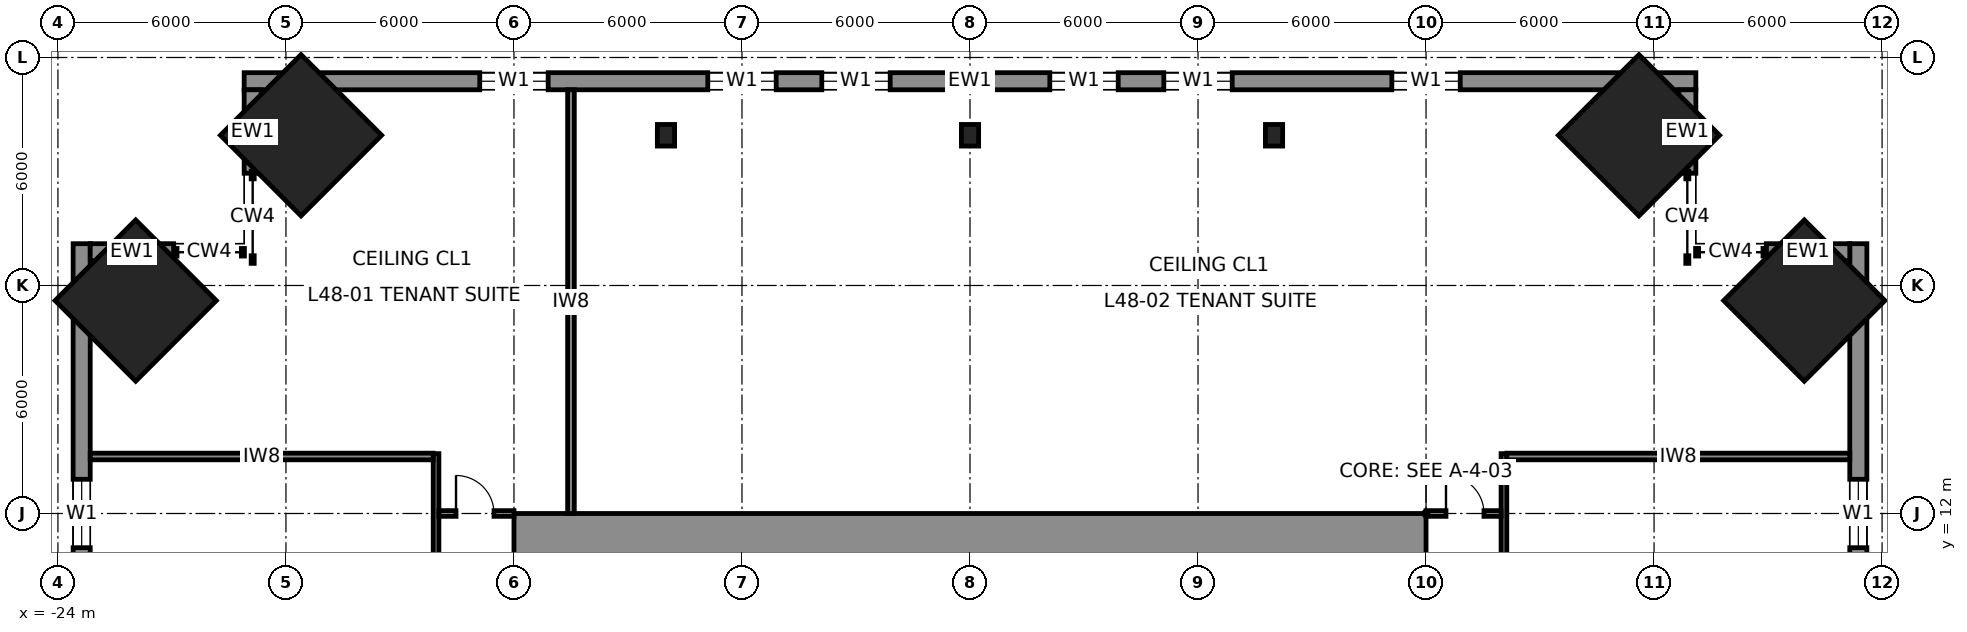
"""IFC4 building model, lengths in metres.
Left out: names, types, materials, properties, quantities, classifications, styles, units other than length and angle.
Written with IfcOpenShell. Run it as: python <this file> out.ifc"""

import sys

from ifc_helpers import new_model, si_unit, direction, frame, frame_2d, origin, origin_2d, place, context, subcontext, project, spatial, rectangle, i_section, extrude, element, fill, save


model = new_model("IFC4")
c1 = context("Model", 3, precision=1e-05, world=origin(), true_north=direction((0.0, 1.0)))
c2 = subcontext(c1, "Body", "Model", "MODEL_VIEW")
j1 = project(units=[si_unit("LENGTHUNIT", "METRE"), si_unit("PLANEANGLEUNIT", "RADIAN")], contexts=[c1])
p1 = place(None, origin())
s1 = spatial("IfcSite", under=j1, at=p1, CompositionType="ELEMENT")
p2 = place(p1, origin())
s2 = spatial("IfcBuilding", under=s1, at=p2, CompositionType="ELEMENT")
p3 = place(p2, frame((0.0, 0.0, 221.8)))
s3 = spatial("IfcBuildingStorey", under=s2, at=p3, CompositionType="ELEMENT", Elevation=221.8)
for number, where, z_axis, x_axis in (
    (1, (17.603, 21.953, 0.0), (-0.04, -0.04, 0.998), (0.707, -0.708, 0.0)),
    (2, (21.953, 17.603, 0.0), (-0.04, -0.04, 0.998), (0.708, -0.707, 0.0)),
    (3, (-21.953, 17.603, 0.0), (0.04, -0.04, 0.998), (0.708, 0.707, 0.0)),
    (4, (-17.603, 21.953, 0.0), (0.04, -0.04, 0.998), (0.707, 0.708, 0.0)),
):
    element("IfcColumn", number, at=place(p3, frame(where, z_axis=z_axis, x_axis=x_axis)), inside=s3, PredefinedType="COLUMN", context=c2, shape_type="SweptSolid", body=[
        extrude(rectangle(XDim=3.0, YDim=3.0, at=origin_2d()), origin(), (0.0, 0.0, 1.0), 4.007),
    ])
for number, where, z_axis, x_axis in (
    (5, (0.0, 21.953, 0.0), (0.0, -0.04, 0.999), (1.0, 0.0, 0.0)),
    (6, (8.0, 21.953, 0.0), (0.0, -0.04, 0.999), (1.0, 0.0, 0.0)),
    (7, (-8.0, 21.953, 0.0), (0.0, -0.04, 0.999), (1.0, 0.0, 0.0)),
):
    element("IfcColumn", number, at=place(p3, frame(where, z_axis=z_axis, x_axis=x_axis)), inside=s3, PredefinedType="COLUMN", context=c2, shape_type="SweptSolid", body=[
        extrude(i_section(OverallWidth=0.454, OverallDepth=0.569, WebThickness=0.078, FlangeThickness=0.125, at=origin_2d()), origin(), (0.0, 0.0, 1.0), 4.003),
    ])
p4 = place(p3, frame((-12.0, 11.25, 0.0), z_axis=(0.0, 0.0, 1.0), x_axis=(1.0, 0.0, 0.0)))
e8 = element("IfcWall", 8, at=p4, inside=s3, PredefinedType="SHEAR", context=c2, shape_type="SweptSolid", body=[
    extrude(rectangle(XDim=24.0, YDim=1.5, at=frame_2d((12.0, 0.0))), origin(), (0.0, 0.0, 1.0), 4.0),
])
p5 = place(p3, frame((19.1, 23.375, 0.0), z_axis=(0.0, 0.0, 1.0), x_axis=(-1.0, 0.0, 0.0)))
e9 = element("IfcWall", 9, at=p5, inside=s3, PredefinedType="SOLIDWALL", context=c2, shape_type="SweptSolid", body=[
    extrude(rectangle(XDim=38.2, YDim=0.45, at=frame_2d((19.1, 0.0))), origin(), (0.0, 0.0, 1.0), 3.83),
])
p6 = place(p5, frame((6.2, 0.0, 0.7)))
e10 = element("IfcOpeningElement", 10, at=p6, cuts=e9, PredefinedType="OPENING", context=c2, shape_type="SweptSolid", body=[
    extrude(rectangle(XDim=1.8, YDim=2.6, at=frame_2d((0.9, 1.3))), frame((0.0, 0.235, 0.0), z_axis=(0.0, -1.0, 0.0), x_axis=(1.0, 0.0, 0.0)), (0.0, 0.0, 1.0), 0.47),
])
p7 = place(p5, frame((12.2, 0.0, 0.7)))
e11 = element("IfcOpeningElement", 11, at=p7, cuts=e9, PredefinedType="OPENING", context=c2, shape_type="SweptSolid", body=[
    extrude(rectangle(XDim=1.8, YDim=2.6, at=frame_2d((0.9, 1.3))), frame((0.0, 0.235, 0.0), z_axis=(0.0, -1.0, 0.0), x_axis=(1.0, 0.0, 0.0)), (0.0, 0.0, 1.0), 0.47),
])
p8 = place(p5, frame((15.2, 0.0, 0.7)))
e12 = element("IfcOpeningElement", 12, at=p8, cuts=e9, PredefinedType="OPENING", context=c2, shape_type="SweptSolid", body=[
    extrude(rectangle(XDim=1.8, YDim=2.6, at=frame_2d((0.9, 1.3))), frame((0.0, 0.235, 0.0), z_axis=(0.0, -1.0, 0.0), x_axis=(1.0, 0.0, 0.0)), (0.0, 0.0, 1.0), 0.47),
])
p9 = place(p5, frame((21.2, 0.0, 0.7)))
e13 = element("IfcOpeningElement", 13, at=p9, cuts=e9, PredefinedType="OPENING", context=c2, shape_type="SweptSolid", body=[
    extrude(rectangle(XDim=1.8, YDim=2.6, at=frame_2d((0.9, 1.3))), frame((0.0, 0.235, 0.0), z_axis=(0.0, -1.0, 0.0), x_axis=(1.0, 0.0, 0.0)), (0.0, 0.0, 1.0), 0.47),
])
p10 = place(p5, frame((24.2, 0.0, 0.7)))
e14 = element("IfcOpeningElement", 14, at=p10, cuts=e9, PredefinedType="OPENING", context=c2, shape_type="SweptSolid", body=[
    extrude(rectangle(XDim=1.8, YDim=2.6, at=frame_2d((0.9, 1.3))), frame((0.0, 0.235, 0.0), z_axis=(0.0, -1.0, 0.0), x_axis=(1.0, 0.0, 0.0)), (0.0, 0.0, 1.0), 0.47),
])
p11 = place(p5, frame((30.2, 0.0, 0.7)))
e15 = element("IfcOpeningElement", 15, at=p11, cuts=e9, PredefinedType="OPENING", context=c2, shape_type="SweptSolid", body=[
    extrude(rectangle(XDim=1.8, YDim=2.6, at=frame_2d((0.9, 1.3))), frame((0.0, 0.235, 0.0), z_axis=(0.0, -1.0, 0.0), x_axis=(1.0, 0.0, 0.0)), (0.0, 0.0, 1.0), 0.47),
])
p12 = place(p3, frame((23.375, -19.1, 0.0), z_axis=(0.0, 0.0, 1.0), x_axis=(0.0, 1.0, 0.0)))
e16 = element("IfcWall", 16, at=p12, inside=s3, PredefinedType="SOLIDWALL", context=c2, shape_type="SweptSolid", body=[
    extrude(rectangle(XDim=38.2, YDim=0.45, at=frame_2d((19.1, 0.0))), origin(), (0.0, 0.0, 1.0), 3.83),
])
p13 = place(p12, frame((6.2, 0.0, 0.7)))
e17 = element("IfcOpeningElement", 17, at=p13, cuts=e16, PredefinedType="OPENING", context=c2, shape_type="SweptSolid", body=[
    extrude(rectangle(XDim=1.8, YDim=2.6, at=frame_2d((0.9, 1.3))), frame((0.0, 0.235, 0.0), z_axis=(0.0, -1.0, 0.0), x_axis=(1.0, 0.0, 0.0)), (0.0, 0.0, 1.0), 0.47),
])
p14 = place(p12, frame((12.2, 0.0, 0.7)))
e18 = element("IfcOpeningElement", 18, at=p14, cuts=e16, PredefinedType="OPENING", context=c2, shape_type="SweptSolid", body=[
    extrude(rectangle(XDim=1.8, YDim=2.6, at=frame_2d((0.9, 1.3))), frame((0.0, 0.235, 0.0), z_axis=(0.0, -1.0, 0.0), x_axis=(1.0, 0.0, 0.0)), (0.0, 0.0, 1.0), 0.47),
])
p15 = place(p12, frame((15.2, 0.0, 0.7)))
e19 = element("IfcOpeningElement", 19, at=p15, cuts=e16, PredefinedType="OPENING", context=c2, shape_type="SweptSolid", body=[
    extrude(rectangle(XDim=1.8, YDim=2.6, at=frame_2d((0.9, 1.3))), frame((0.0, 0.235, 0.0), z_axis=(0.0, -1.0, 0.0), x_axis=(1.0, 0.0, 0.0)), (0.0, 0.0, 1.0), 0.47),
])
p16 = place(p12, frame((21.2, 0.0, 0.7)))
e20 = element("IfcOpeningElement", 20, at=p16, cuts=e16, PredefinedType="OPENING", context=c2, shape_type="SweptSolid", body=[
    extrude(rectangle(XDim=1.8, YDim=2.6, at=frame_2d((0.9, 1.3))), frame((0.0, 0.235, 0.0), z_axis=(0.0, -1.0, 0.0), x_axis=(1.0, 0.0, 0.0)), (0.0, 0.0, 1.0), 0.47),
])
p17 = place(p12, frame((24.2, 0.0, 0.7)))
e21 = element("IfcOpeningElement", 21, at=p17, cuts=e16, PredefinedType="OPENING", context=c2, shape_type="SweptSolid", body=[
    extrude(rectangle(XDim=1.8, YDim=2.6, at=frame_2d((0.9, 1.3))), frame((0.0, 0.235, 0.0), z_axis=(0.0, -1.0, 0.0), x_axis=(1.0, 0.0, 0.0)), (0.0, 0.0, 1.0), 0.47),
])
p18 = place(p12, frame((30.2, 0.0, 0.7)))
e22 = element("IfcOpeningElement", 22, at=p18, cuts=e16, PredefinedType="OPENING", context=c2, shape_type="SweptSolid", body=[
    extrude(rectangle(XDim=1.8, YDim=2.6, at=frame_2d((0.9, 1.3))), frame((0.0, 0.235, 0.0), z_axis=(0.0, -1.0, 0.0), x_axis=(1.0, 0.0, 0.0)), (0.0, 0.0, 1.0), 0.47),
])
p19 = place(p3, frame((-23.375, 19.1, 0.0), z_axis=(0.0, 0.0, 1.0), x_axis=(0.0, -1.0, 0.0)))
e23 = element("IfcWall", 23, at=p19, inside=s3, PredefinedType="SOLIDWALL", context=c2, shape_type="SweptSolid", body=[
    extrude(rectangle(XDim=38.2, YDim=0.45, at=frame_2d((19.1, 0.0))), origin(), (0.0, 0.0, 1.0), 3.83),
])
p20 = place(p19, frame((6.2, 0.0, 0.7)))
e24 = element("IfcOpeningElement", 24, at=p20, cuts=e23, PredefinedType="OPENING", context=c2, shape_type="SweptSolid", body=[
    extrude(rectangle(XDim=1.8, YDim=2.6, at=frame_2d((0.9, 1.3))), frame((0.0, 0.235, 0.0), z_axis=(0.0, -1.0, 0.0), x_axis=(1.0, 0.0, 0.0)), (0.0, 0.0, 1.0), 0.47),
])
p21 = place(p19, frame((12.2, 0.0, 0.7)))
e25 = element("IfcOpeningElement", 25, at=p21, cuts=e23, PredefinedType="OPENING", context=c2, shape_type="SweptSolid", body=[
    extrude(rectangle(XDim=1.8, YDim=2.6, at=frame_2d((0.9, 1.3))), frame((0.0, 0.235, 0.0), z_axis=(0.0, -1.0, 0.0), x_axis=(1.0, 0.0, 0.0)), (0.0, 0.0, 1.0), 0.47),
])
p22 = place(p19, frame((15.2, 0.0, 0.7)))
e26 = element("IfcOpeningElement", 26, at=p22, cuts=e23, PredefinedType="OPENING", context=c2, shape_type="SweptSolid", body=[
    extrude(rectangle(XDim=1.8, YDim=2.6, at=frame_2d((0.9, 1.3))), frame((0.0, 0.235, 0.0), z_axis=(0.0, -1.0, 0.0), x_axis=(1.0, 0.0, 0.0)), (0.0, 0.0, 1.0), 0.47),
])
p23 = place(p19, frame((21.2, 0.0, 0.7)))
e27 = element("IfcOpeningElement", 27, at=p23, cuts=e23, PredefinedType="OPENING", context=c2, shape_type="SweptSolid", body=[
    extrude(rectangle(XDim=1.8, YDim=2.6, at=frame_2d((0.9, 1.3))), frame((0.0, 0.235, 0.0), z_axis=(0.0, -1.0, 0.0), x_axis=(1.0, 0.0, 0.0)), (0.0, 0.0, 1.0), 0.47),
])
p24 = place(p19, frame((24.2, 0.0, 0.7)))
e28 = element("IfcOpeningElement", 28, at=p24, cuts=e23, PredefinedType="OPENING", context=c2, shape_type="SweptSolid", body=[
    extrude(rectangle(XDim=1.8, YDim=2.6, at=frame_2d((0.9, 1.3))), frame((0.0, 0.235, 0.0), z_axis=(0.0, -1.0, 0.0), x_axis=(1.0, 0.0, 0.0)), (0.0, 0.0, 1.0), 0.47),
])
p25 = place(p19, frame((30.2, 0.0, 0.7)))
e29 = element("IfcOpeningElement", 29, at=p25, cuts=e23, PredefinedType="OPENING", context=c2, shape_type="SweptSolid", body=[
    extrude(rectangle(XDim=1.8, YDim=2.6, at=frame_2d((0.9, 1.3))), frame((0.0, 0.235, 0.0), z_axis=(0.0, -1.0, 0.0), x_axis=(1.0, 0.0, 0.0)), (0.0, 0.0, 1.0), 0.47),
])
for number, where, z_axis, x_axis in (
    (30, (18.875, 20.954, 0.0), (0.0, 0.0, 1.0), (0.0, 1.0, 0.0)),
    (31, (20.954, 18.875, 0.0), (0.0, 0.0, 1.0), (1.0, 0.0, 0.0)),
    (32, (-18.875, 20.954, 0.0), (0.0, 0.0, 1.0), (0.0, 1.0, 0.0)),
    (33, (-20.954, 18.875, 0.0), (0.0, 0.0, 1.0), (-1.0, 0.0, 0.0)),
):
    element("IfcWall", number, at=place(p3, frame(where, z_axis=z_axis, x_axis=x_axis)), inside=s3, PredefinedType="SOLIDWALL", context=c2, shape_type="SweptSolid", body=[
        extrude(rectangle(XDim=2.196, YDim=0.45, at=frame_2d((1.098, 0.0))), origin(), (0.0, 0.0, 1.0), 3.83),
    ])
p26 = place(p3, frame((14.05, -13.575, 0.0), z_axis=(0.0, 0.0, 1.0), x_axis=(0.0, 1.0, 0.0)))
e34 = element("IfcWall", 34, at=p26, inside=s3, PredefinedType="PARTITIONING", context=c2, shape_type="SweptSolid", body=[
    extrude(rectangle(XDim=27.15, YDim=0.15, at=frame_2d((13.575, 0.0))), origin(), (0.0, 0.0, 1.0), 3.83),
])
p27 = place(p26, frame((21.425, 0.0, 0.0)))
e35 = element("IfcOpeningElement", 35, at=p27, cuts=e34, PredefinedType="OPENING", context=c2, shape_type="SweptSolid", body=[
    extrude(rectangle(XDim=1.0, YDim=2.3, at=frame_2d((0.5, 1.15))), frame((0.0, 0.085, 0.0), z_axis=(0.0, -1.0, 0.0), x_axis=(1.0, 0.0, 0.0)), (0.0, 0.0, 1.0), 0.17),
])
p28 = place(p26, frame((9.325, 0.0, 0.0)))
e36 = element("IfcOpeningElement", 36, at=p28, cuts=e34, PredefinedType="OPENING", context=c2, shape_type="SweptSolid", body=[
    extrude(rectangle(XDim=1.0, YDim=2.3, at=frame_2d((0.5, 1.15))), frame((0.0, 0.085, 0.0), z_axis=(0.0, -1.0, 0.0), x_axis=(1.0, 0.0, 0.0)), (0.0, 0.0, 1.0), 0.17),
])
p29 = place(p26, frame((16.575, 0.0, 0.0)))
e37 = element("IfcOpeningElement", 37, at=p29, cuts=e34, PredefinedType="OPENING", context=c2, shape_type="SweptSolid", body=[
    extrude(rectangle(XDim=1.0, YDim=2.3, at=frame_2d((0.5, 1.15))), frame((0.0, 0.085, 0.0), z_axis=(0.0, -1.0, 0.0), x_axis=(1.0, 0.0, 0.0)), (0.0, 0.0, 1.0), 0.17),
])
p30 = place(p3, frame((-14.05, 13.575, 0.0), z_axis=(0.0, 0.0, 1.0), x_axis=(0.0, -1.0, 0.0)))
e38 = element("IfcWall", 38, at=p30, inside=s3, PredefinedType="PARTITIONING", context=c2, shape_type="SweptSolid", body=[
    extrude(rectangle(XDim=27.15, YDim=0.15, at=frame_2d((13.575, 0.0))), origin(), (0.0, 0.0, 1.0), 3.83),
])
p31 = place(p30, frame((4.725, 0.0, 0.0)))
e39 = element("IfcOpeningElement", 39, at=p31, cuts=e38, PredefinedType="OPENING", context=c2, shape_type="SweptSolid", body=[
    extrude(rectangle(XDim=1.0, YDim=2.3, at=frame_2d((0.5, 1.15))), frame((0.0, 0.085, 0.0), z_axis=(0.0, -1.0, 0.0), x_axis=(1.0, 0.0, 0.0)), (0.0, 0.0, 1.0), 0.17),
])
p32 = place(p30, frame((9.825, 0.0, 0.0)))
e40 = element("IfcOpeningElement", 40, at=p32, cuts=e38, PredefinedType="OPENING", context=c2, shape_type="SweptSolid", body=[
    extrude(rectangle(XDim=1.0, YDim=2.3, at=frame_2d((0.5, 1.15))), frame((0.0, 0.085, 0.0), z_axis=(0.0, -1.0, 0.0), x_axis=(1.0, 0.0, 0.0)), (0.0, 0.0, 1.0), 0.17),
])
p33 = place(p30, frame((18.075, 0.0, 0.0)))
e41 = element("IfcOpeningElement", 41, at=p33, cuts=e38, PredefinedType="OPENING", context=c2, shape_type="SweptSolid", body=[
    extrude(rectangle(XDim=1.0, YDim=2.3, at=frame_2d((0.5, 1.15))), frame((0.0, 0.085, 0.0), z_axis=(0.0, -1.0, 0.0), x_axis=(1.0, 0.0, 0.0)), (0.0, 0.0, 1.0), 0.17),
])
p34 = place(p3, frame((12.0, 12.0, 0.0), z_axis=(0.0, 0.0, 1.0), x_axis=(1.0, 0.0, 0.0)))
e42 = element("IfcWall", 42, at=p34, inside=s3, PredefinedType="PARTITIONING", context=c2, shape_type="SweptSolid", body=[
    extrude(rectangle(XDim=1.975, YDim=0.15, at=frame_2d((0.988, 0.0))), origin(), (0.0, 0.0, 1.0), 3.83),
])
p35 = place(p34, frame((0.525, 0.0, 0.0)))
e43 = element("IfcOpeningElement", 43, at=p35, cuts=e42, PredefinedType="OPENING", context=c2, shape_type="SweptSolid", body=[
    extrude(rectangle(XDim=1.0, YDim=2.3, at=frame_2d((0.5, 1.15))), frame((0.0, 0.085, 0.0), z_axis=(0.0, -1.0, 0.0), x_axis=(1.0, 0.0, 0.0)), (0.0, 0.0, 1.0), 0.17),
])
p36 = place(p3, frame((-13.975, 12.0, 0.0), z_axis=(0.0, 0.0, 1.0), x_axis=(1.0, 0.0, 0.0)))
e44 = element("IfcWall", 44, at=p36, inside=s3, PredefinedType="PARTITIONING", context=c2, shape_type="SweptSolid", body=[
    extrude(rectangle(XDim=1.975, YDim=0.15, at=frame_2d((0.988, 0.0))), origin(), (0.0, 0.0, 1.0), 3.83),
])
p37 = place(p36, frame((0.45, 0.0, 0.0)))
e45 = element("IfcOpeningElement", 45, at=p37, cuts=e44, PredefinedType="OPENING", context=c2, shape_type="SweptSolid", body=[
    extrude(rectangle(XDim=1.0, YDim=2.3, at=frame_2d((0.5, 1.15))), frame((0.0, 0.085, 0.0), z_axis=(0.0, -1.0, 0.0), x_axis=(1.0, 0.0, 0.0)), (0.0, 0.0, 1.0), 0.17),
])
for number, where, z_axis, x_axis in (
    (46, (14.125, 13.5, 0.0), (0.0, 0.0, 1.0), (1.0, 0.0, 0.0)),
    (47, (-23.15, 13.5, 0.0), (0.0, 0.0, 1.0), (1.0, 0.0, 0.0)),
):
    element("IfcWall", number, at=place(p3, frame(where, z_axis=z_axis, x_axis=x_axis)), inside=s3, PredefinedType="PARTITIONING", context=c2, shape_type="SweptSolid", body=[
        extrude(rectangle(XDim=9.025, YDim=0.175, at=frame_2d((4.512, 0.0))), origin(), (0.0, 0.0, 1.0), 3.83),
    ])
p38 = place(p3, frame((-10.5, 12.0, 0.0), z_axis=(0.0, 0.0, 1.0), x_axis=(0.0, 1.0, 0.0)))
e48 = element("IfcWall", 48, at=p38, inside=s3, PredefinedType="PARTITIONING", context=c2, shape_type="SweptSolid", body=[
    extrude(rectangle(XDim=11.15, YDim=0.175, at=frame_2d((5.575, 0.0))), origin(), (0.0, 0.0, 1.0), 3.83),
])
p39 = place(p6, origin())
e49 = element("IfcWindow", 49, at=p39, inside=s3, PartitioningType="SINGLE_PANEL", PredefinedType="WINDOW", context=c2, shape_type="SweptSolid", body=[
    extrude(rectangle(XDim=1.8, YDim=2.6, at=frame_2d((0.9, 1.3))), frame((0.0, 0.03, 0.0), z_axis=(0.0, -1.0, 0.0), x_axis=(1.0, 0.0, 0.0)), (0.0, 0.0, 1.0), 0.06),
])
fill(e10, e49)
p40 = place(p7, origin())
e50 = element("IfcWindow", 50, at=p40, inside=s3, PartitioningType="SINGLE_PANEL", PredefinedType="WINDOW", context=c2, shape_type="SweptSolid", body=[
    extrude(rectangle(XDim=1.8, YDim=2.6, at=frame_2d((0.9, 1.3))), frame((0.0, 0.03, 0.0), z_axis=(0.0, -1.0, 0.0), x_axis=(1.0, 0.0, 0.0)), (0.0, 0.0, 1.0), 0.06),
])
fill(e11, e50)
p41 = place(p8, origin())
e51 = element("IfcWindow", 51, at=p41, inside=s3, PartitioningType="SINGLE_PANEL", PredefinedType="WINDOW", context=c2, shape_type="SweptSolid", body=[
    extrude(rectangle(XDim=1.8, YDim=2.6, at=frame_2d((0.9, 1.3))), frame((0.0, 0.03, 0.0), z_axis=(0.0, -1.0, 0.0), x_axis=(1.0, 0.0, 0.0)), (0.0, 0.0, 1.0), 0.06),
])
fill(e12, e51)
p42 = place(p9, origin())
e52 = element("IfcWindow", 52, at=p42, inside=s3, PartitioningType="SINGLE_PANEL", PredefinedType="WINDOW", context=c2, shape_type="SweptSolid", body=[
    extrude(rectangle(XDim=1.8, YDim=2.6, at=frame_2d((0.9, 1.3))), frame((0.0, 0.03, 0.0), z_axis=(0.0, -1.0, 0.0), x_axis=(1.0, 0.0, 0.0)), (0.0, 0.0, 1.0), 0.06),
])
fill(e13, e52)
p43 = place(p10, origin())
e53 = element("IfcWindow", 53, at=p43, inside=s3, PartitioningType="SINGLE_PANEL", PredefinedType="WINDOW", context=c2, shape_type="SweptSolid", body=[
    extrude(rectangle(XDim=1.8, YDim=2.6, at=frame_2d((0.9, 1.3))), frame((0.0, 0.03, 0.0), z_axis=(0.0, -1.0, 0.0), x_axis=(1.0, 0.0, 0.0)), (0.0, 0.0, 1.0), 0.06),
])
fill(e14, e53)
p44 = place(p11, origin())
e54 = element("IfcWindow", 54, at=p44, inside=s3, PartitioningType="SINGLE_PANEL", PredefinedType="WINDOW", context=c2, shape_type="SweptSolid", body=[
    extrude(rectangle(XDim=1.8, YDim=2.6, at=frame_2d((0.9, 1.3))), frame((0.0, 0.03, 0.0), z_axis=(0.0, -1.0, 0.0), x_axis=(1.0, 0.0, 0.0)), (0.0, 0.0, 1.0), 0.06),
])
fill(e15, e54)
p45 = place(p18, origin())
e55 = element("IfcWindow", 55, at=p45, inside=s3, PartitioningType="SINGLE_PANEL", PredefinedType="WINDOW", context=c2, shape_type="SweptSolid", body=[
    extrude(rectangle(XDim=1.8, YDim=2.6, at=frame_2d((0.9, 1.3))), frame((0.0, 0.03, 0.0), z_axis=(0.0, -1.0, 0.0), x_axis=(1.0, 0.0, 0.0)), (0.0, 0.0, 1.0), 0.06),
])
fill(e22, e55)
p46 = place(p20, origin())
e56 = element("IfcWindow", 56, at=p46, inside=s3, PartitioningType="SINGLE_PANEL", PredefinedType="WINDOW", context=c2, shape_type="SweptSolid", body=[
    extrude(rectangle(XDim=1.8, YDim=2.6, at=frame_2d((0.9, 1.3))), frame((0.0, 0.03, 0.0), z_axis=(0.0, -1.0, 0.0), x_axis=(1.0, 0.0, 0.0)), (0.0, 0.0, 1.0), 0.06),
])
fill(e24, e56)
p47 = place(p37, origin())
e57 = element("IfcDoor", 57, at=p47, inside=s3, OperationType="SINGLE_SWING_LEFT", PredefinedType="DOOR", context=c2, shape_type="SweptSolid", body=[
    extrude(rectangle(XDim=1.0, YDim=2.3, at=frame_2d((0.5, 1.15))), frame((0.0, 0.025, 0.0), z_axis=(0.0, -1.0, 0.0), x_axis=(1.0, 0.0, 0.0)), (0.0, 0.0, 1.0), 0.05),
])
fill(e45, e57)
p48 = place(p35, origin())
e58 = element("IfcDoor", 58, at=p48, inside=s3, OperationType="SINGLE_SWING_LEFT", PredefinedType="DOOR", context=c2, shape_type="SweptSolid", body=[
    extrude(rectangle(XDim=1.0, YDim=2.3, at=frame_2d((0.5, 1.15))), frame((0.0, 0.025, 0.0), z_axis=(0.0, -1.0, 0.0), x_axis=(1.0, 0.0, 0.0)), (0.0, 0.0, 1.0), 0.05),
])
fill(e43, e58)
save(model, sys.argv[1])
